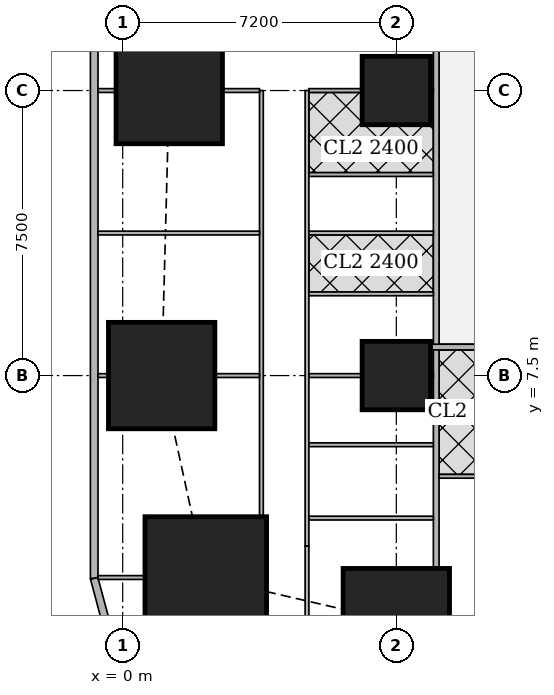
"""IFC4 building model, lengths in metres.
Left out: names, types, materials, properties, quantities, classifications, styles, units other than length and angle.
Written with IfcOpenShell. Run it as: python <this file> out.ifc"""

import sys

from ifc_helpers import new_model, si_unit, direction, frame, frame_2d, origin, origin_2d, place, context, subcontext, project, spatial, rectangle, extrude, element, fill, save


model = new_model("IFC4")
c1 = context("Model", 3, precision=1e-05, world=origin(), true_north=direction((0.0, 1.0)))
c2 = subcontext(c1, "Body", "Model", "MODEL_VIEW")
j1 = project(units=[si_unit("LENGTHUNIT", "METRE"), si_unit("PLANEANGLEUNIT", "RADIAN")], contexts=[c1])
p1 = place(None, origin())
s1 = spatial("IfcSite", under=j1, at=p1, CompositionType="ELEMENT")
p2 = place(p1, origin())
s2 = spatial("IfcBuilding", under=s1, at=p2, CompositionType="ELEMENT")
p3 = place(p2, frame((0.0, 0.0, 31.25)))
s3 = spatial("IfcBuildingStorey", under=s2, at=p3, CompositionType="ELEMENT", Elevation=31.25)
p4 = place(p3, frame((7.2, 1.025, 0.0), z_axis=(0.0, 0.0, 1.0), x_axis=(1.0, 0.0, 0.0)))
e1 = element("IfcColumn", 1, at=p4, inside=s3, PredefinedType="COLUMN", context=c2, shape_type="SweptSolid", body=[
    extrude(rectangle(XDim=2.8, YDim=2.8, at=origin_2d()), origin(), (0.0, 0.0, 1.0), 3.75),
])
p5 = place(p3, frame((2.186, 2.186, 0.0), z_axis=(0.0, 0.0, 1.0), x_axis=(1.0, 0.0, 0.0)))
e2 = element("IfcColumn", 2, at=p5, inside=s3, PredefinedType="COLUMN", context=c2, shape_type="SweptSolid", body=[
    extrude(rectangle(XDim=3.2, YDim=3.2, at=origin_2d()), origin(), (0.0, 0.0, 1.0), 3.75),
])
p6 = place(p3, frame((1.025, 7.5, 0.0), z_axis=(0.0, 0.0, 1.0), x_axis=(1.0, 0.0, 0.0)))
e3 = element("IfcColumn", 3, at=p6, inside=s3, PredefinedType="COLUMN", context=c2, shape_type="SweptSolid", body=[
    extrude(rectangle(XDim=2.8, YDim=2.8, at=origin_2d()), origin(), (0.0, 0.0, 1.0), 3.75),
])
p7 = place(p3, frame((7.2, 7.5, 0.0), z_axis=(0.0, 0.0, 1.0), x_axis=(1.0, 0.0, 0.0)))
e4 = element("IfcColumn", 4, at=p7, inside=s3, PredefinedType="COLUMN", context=c2, shape_type="SweptSolid", body=[
    extrude(rectangle(XDim=1.8, YDim=1.8, at=origin_2d()), origin(), (0.0, 0.0, 1.0), 3.75),
])
p8 = place(p3, frame((1.225, 15.0, 0.0), z_axis=(0.0, 0.0, 1.0), x_axis=(1.0, 0.0, 0.0)))
e5 = element("IfcColumn", 5, at=p8, inside=s3, PredefinedType="COLUMN", context=c2, shape_type="SweptSolid", body=[
    extrude(rectangle(XDim=2.8, YDim=2.8, at=origin_2d()), origin(), (0.0, 0.0, 1.0), 3.75),
])
p9 = place(p3, frame((7.2, 15.0, 0.0), z_axis=(0.0, 0.0, 1.0), x_axis=(1.0, 0.0, 0.0)))
e6 = element("IfcColumn", 6, at=p9, inside=s3, PredefinedType="COLUMN", context=c2, shape_type="SweptSolid", body=[
    extrude(rectangle(XDim=1.8, YDim=1.8, at=origin_2d()), origin(), (0.0, 0.0, 1.0), 3.75),
])
p10 = place(p3, frame((-0.75, 42.837, 0.0), z_axis=(0.0, 0.0, 1.0), x_axis=(0.0, -1.0, 0.0)))
e7 = element("IfcWall", 7, at=p10, inside=s3, PredefinedType="SOLIDWALL", context=c2, shape_type="SweptSolid", body=[
    extrude(rectangle(XDim=40.674, YDim=0.2, at=frame_2d((20.337, 0.0))), origin(), (0.0, 0.0, 1.0), 3.5),
])
p11 = place(p10, frame((1.78, 0.0, 0.9)))
e8 = element("IfcOpeningElement", 8, at=p11, cuts=e7, PredefinedType="OPENING", context=c2, shape_type="SweptSolid", body=[
    extrude(rectangle(XDim=1.8, YDim=1.5, at=frame_2d((0.9, 0.75))), frame((0.0, 0.11, 0.0), z_axis=(0.0, -1.0, 0.0), x_axis=(1.0, 0.0, 0.0)), (0.0, 0.0, 1.0), 0.22),
])
p12 = place(p10, frame((6.312, 0.0, 0.9)))
e9 = element("IfcOpeningElement", 9, at=p12, cuts=e7, PredefinedType="OPENING", context=c2, shape_type="SweptSolid", body=[
    extrude(rectangle(XDim=1.8, YDim=1.5, at=frame_2d((0.9, 0.75))), frame((0.0, 0.11, 0.0), z_axis=(0.0, -1.0, 0.0), x_axis=(1.0, 0.0, 0.0)), (0.0, 0.0, 1.0), 0.22),
])
p13 = place(p10, frame((10.062, 0.0, 0.9)))
e10 = element("IfcOpeningElement", 10, at=p13, cuts=e7, PredefinedType="OPENING", context=c2, shape_type="SweptSolid", body=[
    extrude(rectangle(XDim=1.8, YDim=1.5, at=frame_2d((0.9, 0.75))), frame((0.0, 0.11, 0.0), z_axis=(0.0, -1.0, 0.0), x_axis=(1.0, 0.0, 0.0)), (0.0, 0.0, 1.0), 0.22),
])
p14 = place(p10, frame((13.812, 0.0, 0.9)))
e11 = element("IfcOpeningElement", 11, at=p14, cuts=e7, PredefinedType="OPENING", context=c2, shape_type="SweptSolid", body=[
    extrude(rectangle(XDim=1.8, YDim=1.5, at=frame_2d((0.9, 0.75))), frame((0.0, 0.11, 0.0), z_axis=(0.0, -1.0, 0.0), x_axis=(1.0, 0.0, 0.0)), (0.0, 0.0, 1.0), 0.22),
])
p15 = place(p10, frame((17.562, 0.0, 0.9)))
e12 = element("IfcOpeningElement", 12, at=p15, cuts=e7, PredefinedType="OPENING", context=c2, shape_type="SweptSolid", body=[
    extrude(rectangle(XDim=1.8, YDim=1.5, at=frame_2d((0.9, 0.75))), frame((0.0, 0.11, 0.0), z_axis=(0.0, -1.0, 0.0), x_axis=(1.0, 0.0, 0.0)), (0.0, 0.0, 1.0), 0.22),
])
p16 = place(p10, frame((21.312, 0.0, 0.9)))
e13 = element("IfcOpeningElement", 13, at=p16, cuts=e7, PredefinedType="OPENING", context=c2, shape_type="SweptSolid", body=[
    extrude(rectangle(XDim=1.8, YDim=1.5, at=frame_2d((0.9, 0.75))), frame((0.0, 0.11, 0.0), z_axis=(0.0, -1.0, 0.0), x_axis=(1.0, 0.0, 0.0)), (0.0, 0.0, 1.0), 0.22),
])
p17 = place(p10, frame((25.062, 0.0, 0.9)))
e14 = element("IfcOpeningElement", 14, at=p17, cuts=e7, PredefinedType="OPENING", context=c2, shape_type="SweptSolid", body=[
    extrude(rectangle(XDim=1.8, YDim=1.5, at=frame_2d((0.9, 0.75))), frame((0.0, 0.11, 0.0), z_axis=(0.0, -1.0, 0.0), x_axis=(1.0, 0.0, 0.0)), (0.0, 0.0, 1.0), 0.22),
])
p18 = place(p10, frame((28.812, 0.0, 0.9)))
e15 = element("IfcOpeningElement", 15, at=p18, cuts=e7, PredefinedType="OPENING", context=c2, shape_type="SweptSolid", body=[
    extrude(rectangle(XDim=1.8, YDim=1.5, at=frame_2d((0.9, 0.75))), frame((0.0, 0.11, 0.0), z_axis=(0.0, -1.0, 0.0), x_axis=(1.0, 0.0, 0.0)), (0.0, 0.0, 1.0), 0.22),
])
p19 = place(p10, frame((32.562, 0.0, 0.9)))
e16 = element("IfcOpeningElement", 16, at=p19, cuts=e7, PredefinedType="OPENING", context=c2, shape_type="SweptSolid", body=[
    extrude(rectangle(XDim=1.8, YDim=1.5, at=frame_2d((0.9, 0.75))), frame((0.0, 0.11, 0.0), z_axis=(0.0, -1.0, 0.0), x_axis=(1.0, 0.0, 0.0)), (0.0, 0.0, 1.0), 0.22),
])
p20 = place(p10, frame((37.094, 0.0, 0.9)))
e17 = element("IfcOpeningElement", 17, at=p20, cuts=e7, PredefinedType="OPENING", context=c2, shape_type="SweptSolid", body=[
    extrude(rectangle(XDim=1.8, YDim=1.5, at=frame_2d((0.9, 0.75))), frame((0.0, 0.11, 0.0), z_axis=(0.0, -1.0, 0.0), x_axis=(1.0, 0.0, 0.0)), (0.0, 0.0, 1.0), 0.22),
])
p21 = place(p3, frame((-0.75, 2.163, 0.0), z_axis=(0.0, 0.0, 1.0), x_axis=(0.259168954497, -0.965832000415, 0.0)))
e18 = element("IfcWall", 18, at=p21, inside=s3, PredefinedType="SOLIDWALL", context=c2, shape_type="SweptSolid", body=[
    extrude(rectangle(XDim=1.513, YDim=0.2, at=frame_2d((0.756, 0.0))), origin(), (0.0, 0.0, 1.0), 3.5),
])
p22 = place(p3, frame((8.25, 2.426, 0.0), z_axis=(0.0, 0.0, 1.0), x_axis=(0.0, 1.0, 0.0)))
e19 = element("IfcWall", 19, at=p22, inside=s3, PredefinedType="SOLIDWALL", context=c2, shape_type="SweptSolid", body=[
    extrude(rectangle(XDim=40.173, YDim=0.15, at=frame_2d((20.086, 0.0))), origin(), (0.0, 0.0, 1.0), 3.5),
])
p23 = place(p22, frame((14.161, 0.0, 0.0)))
e20 = element("IfcOpeningElement", 20, at=p23, cuts=e19, PredefinedType="OPENING", context=c2, shape_type="SweptSolid", body=[
    extrude(rectangle(XDim=1.0, YDim=2.1, at=frame_2d((0.5, 1.05))), frame((0.0, 0.085, 0.0), z_axis=(0.0, -1.0, 0.0), x_axis=(1.0, 0.0, 0.0)), (0.0, 0.0, 1.0), 0.17),
])
p24 = place(p22, frame((17.487, 0.0, 0.0)))
e21 = element("IfcOpeningElement", 21, at=p24, cuts=e19, PredefinedType="OPENING", context=c2, shape_type="SweptSolid", body=[
    extrude(rectangle(XDim=1.0, YDim=2.1, at=frame_2d((0.5, 1.05))), frame((0.0, 0.085, 0.0), z_axis=(0.0, -1.0, 0.0), x_axis=(1.0, 0.0, 0.0)), (0.0, 0.0, 1.0), 0.17),
])
p25 = place(p22, frame((29.161, 0.0, 0.0)))
e22 = element("IfcOpeningElement", 22, at=p25, cuts=e19, PredefinedType="OPENING", context=c2, shape_type="SweptSolid", body=[
    extrude(rectangle(XDim=1.0, YDim=2.1, at=frame_2d((0.5, 1.05))), frame((0.0, 0.085, 0.0), z_axis=(0.0, -1.0, 0.0), x_axis=(1.0, 0.0, 0.0)), (0.0, 0.0, 1.0), 0.17),
])
p26 = place(p3, frame((13.499, 8.25, 0.0), z_axis=(0.0, 0.0, 1.0), x_axis=(-1.0, 0.0, 0.0)))
e23 = element("IfcWall", 23, at=p26, inside=s3, PredefinedType="SOLIDWALL", context=c2, shape_type="SweptSolid", body=[
    extrude(rectangle(XDim=5.399, YDim=0.15, at=frame_2d((2.699, 0.0))), origin(), (0.0, 0.0, 1.0), 3.5),
])
p27 = place(p26, frame((0.66, 0.0, 0.0)))
e24 = element("IfcOpeningElement", 24, at=p27, cuts=e23, PredefinedType="OPENING", context=c2, shape_type="SweptSolid", body=[
    extrude(rectangle(XDim=1.0, YDim=2.1, at=frame_2d((0.5, 1.05))), frame((0.0, 0.085, 0.0), z_axis=(0.0, -1.0, 0.0), x_axis=(1.0, 0.0, 0.0)), (0.0, 0.0, 1.0), 0.17),
])
p28 = place(p3, frame((3.65, 3.787, 0.0), z_axis=(0.0, 0.0, 1.0), x_axis=(0.0, 1.0, 0.0)))
e25 = element("IfcWall", 25, at=p28, inside=s3, PredefinedType="PARTITIONING", context=c2, shape_type="SweptSolid", body=[
    extrude(rectangle(XDim=11.213, YDim=0.1, at=frame_2d((5.606, 0.0))), origin(), (0.0, 0.0, 1.0), 3.5),
])
p29 = place(p28, frame((8.9, 0.0, 0.0)))
e26 = element("IfcOpeningElement", 26, at=p29, cuts=e25, PredefinedType="OPENING", context=c2, shape_type="SweptSolid", body=[
    extrude(rectangle(XDim=0.9, YDim=2.1, at=frame_2d((0.45, 1.05))), frame((0.0, 0.06, 0.0), z_axis=(0.0, -1.0, 0.0), x_axis=(1.0, 0.0, 0.0)), (0.0, 0.0, 1.0), 0.12),
])
p30 = place(p28, frame((6.363, 0.0, 0.0)))
e27 = element("IfcOpeningElement", 27, at=p30, cuts=e25, PredefinedType="OPENING", context=c2, shape_type="SweptSolid", body=[
    extrude(rectangle(XDim=0.9, YDim=2.1, at=frame_2d((0.45, 1.05))), frame((0.0, 0.06, 0.0), z_axis=(0.0, -1.0, 0.0), x_axis=(1.0, 0.0, 0.0)), (0.0, 0.0, 1.0), 0.12),
])
p31 = place(p28, frame((1.4, 0.0, 0.0)))
e28 = element("IfcOpeningElement", 28, at=p31, cuts=e25, PredefinedType="OPENING", context=c2, shape_type="SweptSolid", body=[
    extrude(rectangle(XDim=0.9, YDim=2.1, at=frame_2d((0.45, 1.05))), frame((0.0, 0.06, 0.0), z_axis=(0.0, -1.0, 0.0), x_axis=(1.0, 0.0, 0.0)), (0.0, 0.0, 1.0), 0.12),
])
p32 = place(p3, frame((4.85, 0.121, 0.0), z_axis=(0.0, 0.0, 1.0), x_axis=(0.0, 1.0, 0.0)))
e29 = element("IfcWall", 29, at=p32, inside=s3, PredefinedType="PARTITIONING", context=c2, shape_type="SweptSolid", body=[
    extrude(rectangle(XDim=2.897, YDim=0.1, at=frame_2d((1.448, 0.0))), origin(), (0.0, 0.0, 1.0), 2.05),
])
p33 = place(p3, frame((4.85, 3.018, 0.0), z_axis=(0.0, 0.0, 1.0), x_axis=(0.0, 1.0, 0.0)))
e30 = element("IfcWall", 30, at=p33, inside=s3, PredefinedType="PARTITIONING", context=c2, shape_type="SweptSolid", body=[
    extrude(rectangle(XDim=11.982, YDim=0.1, at=frame_2d((5.991, 0.0))), origin(), (0.0, 0.0, 1.0), 3.5),
])
p34 = place(p33, frame((10.427, 0.0, 0.0)))
e31 = element("IfcOpeningElement", 31, at=p34, cuts=e30, PredefinedType="OPENING", context=c2, shape_type="SweptSolid", body=[
    extrude(rectangle(XDim=0.9, YDim=2.1, at=frame_2d((0.45, 1.05))), frame((0.0, 0.06, 0.0), z_axis=(0.0, -1.0, 0.0), x_axis=(1.0, 0.0, 0.0)), (0.0, 0.0, 1.0), 0.12),
])
p35 = place(p33, frame((6.982, 0.0, 0.0)))
e32 = element("IfcOpeningElement", 32, at=p35, cuts=e30, PredefinedType="OPENING", context=c2, shape_type="SweptSolid", body=[
    extrude(rectangle(XDim=0.9, YDim=2.1, at=frame_2d((0.45, 1.05))), frame((0.0, 0.06, 0.0), z_axis=(0.0, -1.0, 0.0), x_axis=(1.0, 0.0, 0.0)), (0.0, 0.0, 1.0), 0.12),
])
p36 = place(p33, frame((3.122, 0.0, 0.0)))
e33 = element("IfcOpeningElement", 33, at=p36, cuts=e30, PredefinedType="OPENING", context=c2, shape_type="SweptSolid", body=[
    extrude(rectangle(XDim=0.9, YDim=2.1, at=frame_2d((0.45, 1.05))), frame((0.0, 0.06, 0.0), z_axis=(0.0, -1.0, 0.0), x_axis=(1.0, 0.0, 0.0)), (0.0, 0.0, 1.0), 0.12),
])
p37 = place(p33, frame((8.552, 0.0, 0.0)))
e34 = element("IfcOpeningElement", 34, at=p37, cuts=e30, PredefinedType="OPENING", context=c2, shape_type="SweptSolid", body=[
    extrude(rectangle(XDim=0.9, YDim=2.1, at=frame_2d((0.45, 1.05))), frame((0.0, 0.06, 0.0), z_axis=(0.0, -1.0, 0.0), x_axis=(1.0, 0.0, 0.0)), (0.0, 0.0, 1.0), 0.12),
])
p38 = place(p33, frame((5.107, 0.0, 0.0)))
e35 = element("IfcOpeningElement", 35, at=p38, cuts=e30, PredefinedType="OPENING", context=c2, shape_type="SweptSolid", body=[
    extrude(rectangle(XDim=0.9, YDim=2.1, at=frame_2d((0.45, 1.05))), frame((0.0, 0.06, 0.0), z_axis=(0.0, -1.0, 0.0), x_axis=(1.0, 0.0, 0.0)), (0.0, 0.0, 1.0), 0.12),
])
p39 = place(p33, frame((1.247, 0.0, 0.0)))
e36 = element("IfcOpeningElement", 36, at=p39, cuts=e30, PredefinedType="OPENING", context=c2, shape_type="SweptSolid", body=[
    extrude(rectangle(XDim=0.9, YDim=2.1, at=frame_2d((0.45, 1.05))), frame((0.0, 0.06, 0.0), z_axis=(0.0, -1.0, 0.0), x_axis=(1.0, 0.0, 0.0)), (0.0, 0.0, 1.0), 0.12),
])
p40 = place(p3, frame((-0.65, 2.186, 0.0), z_axis=(0.0, 0.0, 1.0), x_axis=(1.0, 0.0, 0.0)))
e37 = element("IfcWall", 37, at=p40, inside=s3, PredefinedType="PARTITIONING", context=c2, shape_type="SweptSolid", body=[
    extrude(rectangle(XDim=1.235, YDim=0.1, at=frame_2d((0.617, 0.0))), origin(), (0.0, 0.0, 1.0), 3.5),
])
p41 = place(p3, frame((-0.65, 7.5, 0.0), z_axis=(0.0, 0.0, 1.0), x_axis=(1.0, 0.0, 0.0)))
e38 = element("IfcWall", 38, at=p41, inside=s3, PredefinedType="PARTITIONING", context=c2, shape_type="SweptSolid", body=[
    extrude(rectangle(XDim=0.274, YDim=0.1, at=frame_2d((0.137, 0.0))), origin(), (0.0, 0.0, 1.0), 3.5),
])
p42 = place(p3, frame((2.426, 7.5, 0.0), z_axis=(0.0, 0.0, 1.0), x_axis=(1.0, 0.0, 0.0)))
e39 = element("IfcWall", 39, at=p42, inside=s3, PredefinedType="PARTITIONING", context=c2, shape_type="SweptSolid", body=[
    extrude(rectangle(XDim=1.174, YDim=0.1, at=frame_2d((0.587, 0.0))), origin(), (0.0, 0.0, 1.0), 2.05),
])
p43 = place(p3, frame((-0.65, 11.25, 0.0), z_axis=(0.0, 0.0, 1.0), x_axis=(1.0, 0.0, 0.0)))
e40 = element("IfcWall", 40, at=p43, inside=s3, PredefinedType="PARTITIONING", context=c2, shape_type="SweptSolid", body=[
    extrude(rectangle(XDim=4.25, YDim=0.1, at=frame_2d((2.125, 0.0))), origin(), (0.0, 0.0, 1.0), 2.05),
])
p44 = place(p3, frame((-0.65, 15.0, 0.0), z_axis=(0.0, 0.0, 1.0), x_axis=(1.0, 0.0, 0.0)))
e41 = element("IfcWall", 41, at=p44, inside=s3, PredefinedType="PARTITIONING", context=c2, shape_type="SweptSolid", body=[
    extrude(rectangle(XDim=0.474, YDim=0.1, at=frame_2d((0.237, 0.0))), origin(), (0.0, 0.0, 1.0), 3.5),
])
p45 = place(p3, frame((2.626, 15.0, 0.0), z_axis=(0.0, 0.0, 1.0), x_axis=(1.0, 0.0, 0.0)))
e42 = element("IfcWall", 42, at=p45, inside=s3, PredefinedType="PARTITIONING", context=c2, shape_type="SweptSolid", body=[
    extrude(rectangle(XDim=0.974, YDim=0.1, at=frame_2d((0.487, 0.0))), origin(), (0.0, 0.0, 1.0), 3.5),
])
p46 = place(p3, frame((4.9, 3.75, 0.0), z_axis=(0.0, 0.0, 1.0), x_axis=(1.0, 0.0, 0.0)))
e43 = element("IfcWall", 43, at=p46, inside=s3, PredefinedType="PARTITIONING", context=c2, shape_type="SweptSolid", body=[
    extrude(rectangle(XDim=3.275, YDim=0.1, at=frame_2d((1.638, 0.0))), origin(), (0.0, 0.0, 1.0), 3.5),
])
p47 = place(p3, frame((4.9, 7.5, 0.0), z_axis=(0.0, 0.0, 1.0), x_axis=(1.0, 0.0, 0.0)))
e44 = element("IfcWall", 44, at=p47, inside=s3, PredefinedType="PARTITIONING", context=c2, shape_type="SweptSolid", body=[
    extrude(rectangle(XDim=1.399, YDim=0.1, at=frame_2d((0.7, 0.0))), origin(), (0.0, 0.0, 1.0), 3.5),
])
p48 = place(p3, frame((8.101, 7.5, 0.0), z_axis=(0.0, 0.0, 1.0), x_axis=(1.0, 0.0, 0.0)))
e45 = element("IfcWall", 45, at=p48, inside=s3, PredefinedType="PARTITIONING", context=c2, shape_type="SweptSolid", body=[
    extrude(rectangle(XDim=0.074, YDim=0.1, at=frame_2d((0.037, 0.0))), origin(), (0.0, 0.0, 1.0), 3.5),
])
p49 = place(p3, frame((4.9, 11.25, 0.0), z_axis=(0.0, 0.0, 1.0), x_axis=(1.0, 0.0, 0.0)))
e46 = element("IfcWall", 46, at=p49, inside=s3, PredefinedType="PARTITIONING", context=c2, shape_type="SweptSolid", body=[
    extrude(rectangle(XDim=3.275, YDim=0.1, at=frame_2d((1.638, 0.0))), origin(), (0.0, 0.0, 1.0), 3.5),
])
p50 = place(p3, frame((4.9, 15.0, 0.0), z_axis=(0.0, 0.0, 1.0), x_axis=(1.0, 0.0, 0.0)))
e47 = element("IfcWall", 47, at=p50, inside=s3, PredefinedType="PARTITIONING", context=c2, shape_type="SweptSolid", body=[
    extrude(rectangle(XDim=1.399, YDim=0.1, at=frame_2d((0.7, 0.0))), origin(), (0.0, 0.0, 1.0), 3.5),
])
p51 = place(p3, frame((8.101, 15.0, 0.0), z_axis=(0.0, 0.0, 1.0), x_axis=(1.0, 0.0, 0.0)))
e48 = element("IfcWall", 48, at=p51, inside=s3, PredefinedType="PARTITIONING", context=c2, shape_type="SweptSolid", body=[
    extrude(rectangle(XDim=0.074, YDim=0.1, at=frame_2d((0.037, 0.0))), origin(), (0.0, 0.0, 1.0), 3.5),
])
for number, where, z_axis, x_axis in (
    (49, (4.9, 12.79, 0.0), (0.0, 0.0, 1.0), (1.0, 0.0, 0.0)),
    (50, (4.9, 9.65, 0.0), (0.0, 0.0, 1.0), (1.0, 0.0, 0.0)),
    (51, (4.9, 5.68, 0.0), (0.0, 0.0, 1.0), (1.0, 0.0, 0.0)),
):
    element("IfcWall", number, at=place(p3, frame(where, z_axis=z_axis, x_axis=x_axis)), inside=s3, PredefinedType="PARTITIONING", context=c2, shape_type="SweptSolid", body=[
        extrude(rectangle(XDim=3.275, YDim=0.1, at=frame_2d((1.638, 0.0))), origin(), (0.0, 0.0, 1.0), 3.5),
    ])
p52 = place(p3, frame((10.279, 4.85, 0.0), z_axis=(0.0, 0.0, 1.0), x_axis=(-1.0, 0.0, 0.0)))
e52 = element("IfcWall", 52, at=p52, inside=s3, PredefinedType="PARTITIONING", context=c2, shape_type="SweptSolid", body=[
    extrude(rectangle(XDim=1.954, YDim=0.1, at=frame_2d((0.977, 0.0))), origin(), (0.0, 0.0, 1.0), 3.5),
])
p53 = place(p52, frame((0.579, 0.0, 0.0)))
e53 = element("IfcOpeningElement", 53, at=p53, cuts=e52, PredefinedType="OPENING", context=c2, shape_type="SweptSolid", body=[
    extrude(rectangle(XDim=0.9, YDim=2.1, at=frame_2d((0.45, 1.05))), frame((0.0, 0.06, 0.0), z_axis=(0.0, -1.0, 0.0), x_axis=(1.0, 0.0, 0.0)), (0.0, 0.0, 1.0), 0.12),
])
p54 = place(p17, origin())
e54 = element("IfcWindow", 54, at=p54, inside=s3, PartitioningType="SINGLE_PANEL", PredefinedType="WINDOW", context=c2, shape_type="SweptSolid", body=[
    extrude(rectangle(XDim=1.8, YDim=1.5, at=frame_2d((0.9, 0.75))), frame((0.0, 0.03, 0.0), z_axis=(0.0, -1.0, 0.0), x_axis=(1.0, 0.0, 0.0)), (0.0, 0.0, 1.0), 0.06),
])
fill(e14, e54)
p55 = place(p18, origin())
e55 = element("IfcWindow", 55, at=p55, inside=s3, PartitioningType="SINGLE_PANEL", PredefinedType="WINDOW", context=c2, shape_type="SweptSolid", body=[
    extrude(rectangle(XDim=1.8, YDim=1.5, at=frame_2d((0.9, 0.75))), frame((0.0, 0.03, 0.0), z_axis=(0.0, -1.0, 0.0), x_axis=(1.0, 0.0, 0.0)), (0.0, 0.0, 1.0), 0.06),
])
fill(e15, e55)
p56 = place(p19, origin())
e56 = element("IfcWindow", 56, at=p56, inside=s3, PartitioningType="SINGLE_PANEL", PredefinedType="WINDOW", context=c2, shape_type="SweptSolid", body=[
    extrude(rectangle(XDim=1.8, YDim=1.5, at=frame_2d((0.9, 0.75))), frame((0.0, 0.03, 0.0), z_axis=(0.0, -1.0, 0.0), x_axis=(1.0, 0.0, 0.0)), (0.0, 0.0, 1.0), 0.06),
])
fill(e16, e56)
p57 = place(p20, origin())
e57 = element("IfcWindow", 57, at=p57, inside=s3, PartitioningType="SINGLE_PANEL", PredefinedType="WINDOW", context=c2, shape_type="SweptSolid", body=[
    extrude(rectangle(XDim=1.8, YDim=1.5, at=frame_2d((0.9, 0.75))), frame((0.0, 0.03, 0.0), z_axis=(0.0, -1.0, 0.0), x_axis=(1.0, 0.0, 0.0)), (0.0, 0.0, 1.0), 0.06),
])
fill(e17, e57)
p58 = place(p29, origin())
e58 = element("IfcDoor", 58, at=p58, inside=s3, OperationType="SINGLE_SWING_RIGHT", PredefinedType="DOOR", context=c2, shape_type="SweptSolid", body=[
    extrude(rectangle(XDim=0.9, YDim=2.1, at=frame_2d((0.45, 1.05))), frame((0.0, 0.025, 0.0), z_axis=(0.0, -1.0, 0.0), x_axis=(1.0, 0.0, 0.0)), (0.0, 0.0, 1.0), 0.05),
])
fill(e26, e58)
p59 = place(p30, origin())
e59 = element("IfcDoor", 59, at=p59, inside=s3, OperationType="SINGLE_SWING_RIGHT", PredefinedType="DOOR", context=c2, shape_type="SweptSolid", body=[
    extrude(rectangle(XDim=0.9, YDim=2.1, at=frame_2d((0.45, 1.05))), frame((0.0, 0.025, 0.0), z_axis=(0.0, -1.0, 0.0), x_axis=(1.0, 0.0, 0.0)), (0.0, 0.0, 1.0), 0.05),
])
fill(e27, e59)
p60 = place(p31, origin())
e60 = element("IfcDoor", 60, at=p60, inside=s3, OperationType="SINGLE_SWING_LEFT", PredefinedType="DOOR", context=c2, shape_type="SweptSolid", body=[
    extrude(rectangle(XDim=0.9, YDim=2.1, at=frame_2d((0.45, 1.05))), frame((0.0, 0.025, 0.0), z_axis=(0.0, -1.0, 0.0), x_axis=(1.0, 0.0, 0.0)), (0.0, 0.0, 1.0), 0.05),
])
fill(e28, e60)
p61 = place(p34, origin())
e61 = element("IfcDoor", 61, at=p61, inside=s3, OperationType="SINGLE_SWING_LEFT", PredefinedType="DOOR", context=c2, shape_type="SweptSolid", body=[
    extrude(rectangle(XDim=0.9, YDim=2.1, at=frame_2d((0.45, 1.05))), frame((0.0, 0.025, 0.0), z_axis=(0.0, -1.0, 0.0), x_axis=(1.0, 0.0, 0.0)), (0.0, 0.0, 1.0), 0.05),
])
fill(e31, e61)
p62 = place(p35, origin())
e62 = element("IfcDoor", 62, at=p62, inside=s3, OperationType="SINGLE_SWING_LEFT", PredefinedType="DOOR", context=c2, shape_type="SweptSolid", body=[
    extrude(rectangle(XDim=0.9, YDim=2.1, at=frame_2d((0.45, 1.05))), frame((0.0, 0.025, 0.0), z_axis=(0.0, -1.0, 0.0), x_axis=(1.0, 0.0, 0.0)), (0.0, 0.0, 1.0), 0.05),
])
fill(e32, e62)
p63 = place(p36, origin())
e63 = element("IfcDoor", 63, at=p63, inside=s3, OperationType="SINGLE_SWING_LEFT", PredefinedType="DOOR", context=c2, shape_type="SweptSolid", body=[
    extrude(rectangle(XDim=0.9, YDim=2.1, at=frame_2d((0.45, 1.05))), frame((0.0, 0.025, 0.0), z_axis=(0.0, -1.0, 0.0), x_axis=(1.0, 0.0, 0.0)), (0.0, 0.0, 1.0), 0.05),
])
fill(e33, e63)
p64 = place(p37, origin())
e64 = element("IfcDoor", 64, at=p64, inside=s3, OperationType="SINGLE_SWING_RIGHT", PredefinedType="DOOR", context=c2, shape_type="SweptSolid", body=[
    extrude(rectangle(XDim=0.9, YDim=2.1, at=frame_2d((0.45, 1.05))), frame((0.0, 0.025, 0.0), z_axis=(0.0, -1.0, 0.0), x_axis=(1.0, 0.0, 0.0)), (0.0, 0.0, 1.0), 0.05),
])
fill(e34, e64)
p65 = place(p38, origin())
e65 = element("IfcDoor", 65, at=p65, inside=s3, OperationType="SINGLE_SWING_RIGHT", PredefinedType="DOOR", context=c2, shape_type="SweptSolid", body=[
    extrude(rectangle(XDim=0.9, YDim=2.1, at=frame_2d((0.45, 1.05))), frame((0.0, 0.025, 0.0), z_axis=(0.0, -1.0, 0.0), x_axis=(1.0, 0.0, 0.0)), (0.0, 0.0, 1.0), 0.05),
])
fill(e35, e65)
p66 = place(p39, origin())
e66 = element("IfcDoor", 66, at=p66, inside=s3, OperationType="SINGLE_SWING_RIGHT", PredefinedType="DOOR", context=c2, shape_type="SweptSolid", body=[
    extrude(rectangle(XDim=0.9, YDim=2.1, at=frame_2d((0.45, 1.05))), frame((0.0, 0.025, 0.0), z_axis=(0.0, -1.0, 0.0), x_axis=(1.0, 0.0, 0.0)), (0.0, 0.0, 1.0), 0.05),
])
fill(e36, e66)
p67 = place(p53, origin())
e67 = element("IfcDoor", 67, at=p67, inside=s3, OperationType="SINGLE_SWING_LEFT", PredefinedType="DOOR", context=c2, shape_type="SweptSolid", body=[
    extrude(rectangle(XDim=0.9, YDim=2.1, at=frame_2d((0.45, 1.05))), frame((0.0, 0.025, 0.0), z_axis=(0.0, -1.0, 0.0), x_axis=(1.0, 0.0, 0.0)), (0.0, 0.0, 1.0), 0.05),
])
fill(e53, e67)
save(model, sys.argv[1])
